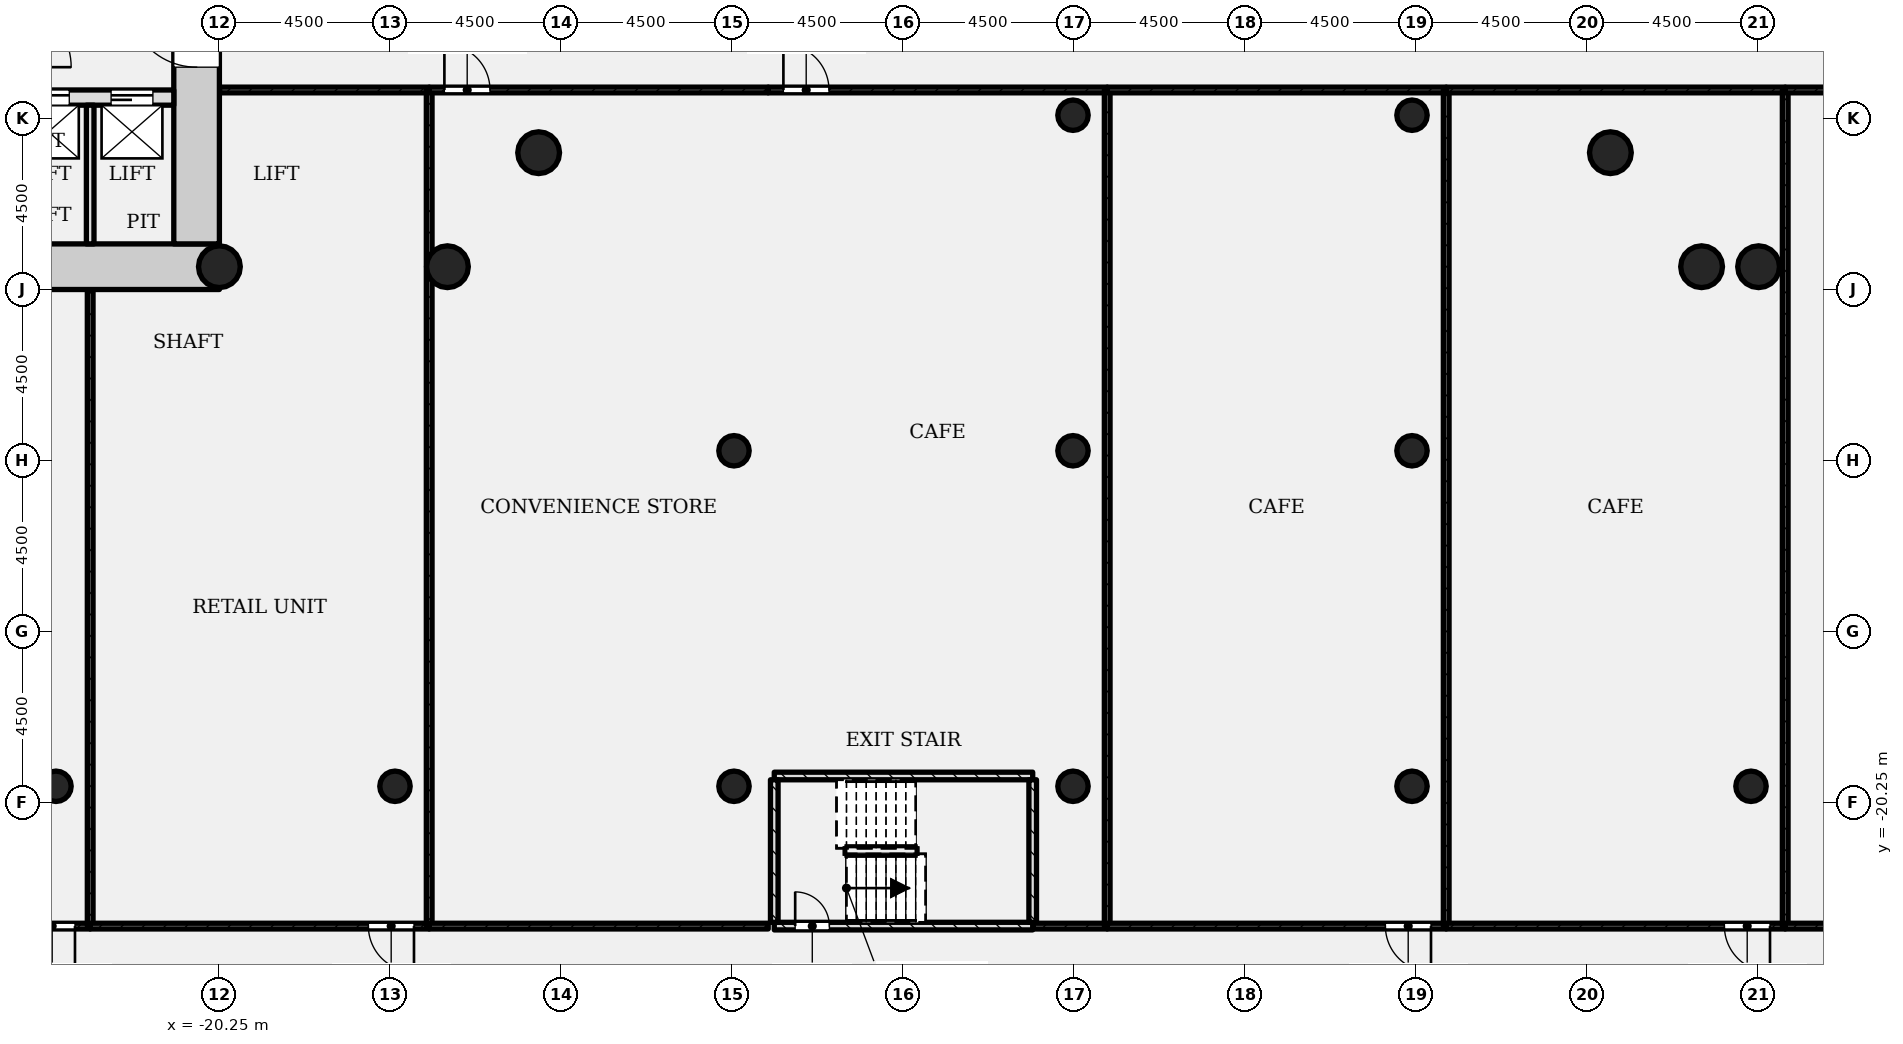
"""IFC4 building model, lengths in metres.
Left out: names, types, materials, properties, quantities, classifications, styles, units other than length and angle.
Written with IfcOpenShell. Run it as: python <this file> out.ifc"""

import sys

from ifc_helpers import new_model, si_unit, direction, frame, frame_2d, origin, origin_2d, place, context, subcontext, project, spatial, rectangle, hollow_circle, extrude, element, fill, save


model = new_model("IFC4")
c1 = context("Model", 3, precision=1e-05, world=origin(), true_north=direction((0.0, 1.0)))
c2 = subcontext(c1, "Body", "Model", "MODEL_VIEW")
j1 = project(units=[si_unit("LENGTHUNIT", "METRE"), si_unit("PLANEANGLEUNIT", "RADIAN")], contexts=[c1])
p1 = place(None, origin())
s1 = spatial("IfcSite", under=j1, at=p1, CompositionType="ELEMENT")
p2 = place(p1, origin())
s2 = spatial("IfcBuilding", under=s1, at=p2, CompositionType="ELEMENT")
p3 = place(p2, origin())
s3 = spatial("IfcBuildingStorey", under=s2, at=p3, CompositionType="ELEMENT", Elevation=0.0)
p4 = place(p3, frame((-28.05, -6.15, -0.4), z_axis=(0.0, 0.0, 1.0), x_axis=(1.0, 0.0, 0.0)))
e1 = element("IfcWall", 1, at=p4, inside=s3, PredefinedType="SHEAR", context=c2, shape_type="SweptSolid", body=[
    extrude(rectangle(XDim=7.8, YDim=1.2, at=frame_2d((3.9, 0.0))), origin(), (0.0, 0.0, 1.0), 6.4),
])
p5 = place(p3, frame((-20.85, -5.55, -0.4), z_axis=(0.0, 0.0, 1.0), x_axis=(0.0, 1.0, 0.0)))
e2 = element("IfcWall", 2, at=p5, inside=s3, PredefinedType="SHEAR", context=c2, shape_type="SweptSolid", body=[
    extrude(rectangle(XDim=12.3, YDim=1.2, at=frame_2d((6.15, 0.0))), origin(), (0.0, 0.0, 1.0), 6.4),
])
p6 = place(p5, frame((4.65, 0.0, 0.4)))
e3 = element("IfcOpeningElement", 3, at=p6, cuts=e2, PredefinedType="OPENING", context=c2, shape_type="SweptSolid", body=[
    extrude(rectangle(XDim=1.8, YDim=2.1, at=frame_2d((0.9, 1.05))), frame((0.0, 0.61, 0.0), z_axis=(0.0, -1.0, 0.0), x_axis=(1.0, 0.0, 0.0)), (0.0, 0.0, 1.0), 1.22),
])
p7 = place(p3, frame((-28.05, -1.7, -0.4), z_axis=(0.0, 0.0, 1.0), x_axis=(1.0, 0.0, 0.0)))
e4 = element("IfcWall", 4, at=p7, inside=s3, PredefinedType="SHEAR", context=c2, shape_type="SweptSolid", body=[
    extrude(rectangle(XDim=6.6, YDim=0.4, at=frame_2d((3.3, 0.0))), origin(), (0.0, 0.0, 1.0), 6.4),
])
p8 = place(p7, frame((0.55, 0.0, 0.4)))
e5 = element("IfcOpeningElement", 5, at=p8, cuts=e4, PredefinedType="OPENING", context=c2, shape_type="SweptSolid", body=[
    extrude(rectangle(XDim=1.1, YDim=2.1, at=frame_2d((0.55, 1.05))), frame((0.0, 0.21, 0.0), z_axis=(0.0, -1.0, 0.0), x_axis=(1.0, 0.0, 0.0)), (0.0, 0.0, 1.0), 0.42),
])
p9 = place(p7, frame((2.75, 0.0, 0.4)))
e6 = element("IfcOpeningElement", 6, at=p9, cuts=e4, PredefinedType="OPENING", context=c2, shape_type="SweptSolid", body=[
    extrude(rectangle(XDim=1.1, YDim=2.1, at=frame_2d((0.55, 1.05))), frame((0.0, 0.21, 0.0), z_axis=(0.0, -1.0, 0.0), x_axis=(1.0, 0.0, 0.0)), (0.0, 0.0, 1.0), 0.42),
])
p10 = place(p7, frame((4.95, 0.0, 0.4)))
e7 = element("IfcOpeningElement", 7, at=p10, cuts=e4, PredefinedType="OPENING", context=c2, shape_type="SweptSolid", body=[
    extrude(rectangle(XDim=1.1, YDim=2.1, at=frame_2d((0.55, 1.05))), frame((0.0, 0.21, 0.0), z_axis=(0.0, -1.0, 0.0), x_axis=(1.0, 0.0, 0.0)), (0.0, 0.0, 1.0), 0.42),
])
for number, where, z_axis, x_axis in (
    (8, (-20.25, -6.15, -0.4), (0.0, 0.0, 1.0), (1.0, 0.0, 0.0)),
    (9, (-14.25, -6.15, -0.4), (0.0, 0.0, 1.0), (1.0, 0.0, 0.0)),
    (10, (-11.85, -3.15, -0.4), (0.0, 0.0, 1.0), (1.0, 0.0, 0.0)),
    (11, (20.25, -6.15, -0.4), (0.0, 0.0, 1.0), (1.0, 0.0, 0.0)),
    (12, (18.75, -6.15, -0.4), (0.0, 0.0, 1.0), (1.0, 0.0, 0.0)),
    (13, (16.35, -3.15, -0.4), (0.0, 0.0, 1.0), (1.0, 0.0, 0.0)),
):
    element("IfcColumn", number, at=place(p3, frame(where, z_axis=z_axis, x_axis=x_axis)), inside=s3, PredefinedType="COLUMN", context=c2, shape_type="SweptSolid", body=[
        extrude(hollow_circle(Radius=0.55, WallThickness=0.04, at=origin_2d()), origin(), (0.0, 0.0, 1.0), 6.4),
    ])
for number, where, z_axis, x_axis in (
    (14, (-24.55, -19.821, -0.4), (0.0, 0.0, 1.0), (1.0, 0.0, 0.0)),
    (15, (-15.63, -19.821, -0.4), (0.0, 0.0, 1.0), (1.0, 0.0, 0.0)),
    (16, (-6.71, -19.821, -0.4), (0.0, 0.0, 1.0), (1.0, 0.0, 0.0)),
    (17, (2.21, -19.821, -0.4), (0.0, 0.0, 1.0), (1.0, 0.0, 0.0)),
    (18, (11.13, -19.821, -0.4), (0.0, 0.0, 1.0), (1.0, 0.0, 0.0)),
    (19, (20.05, -19.821, -0.4), (0.0, 0.0, 1.0), (1.0, 0.0, 0.0)),
    (20, (-6.71, -10.993, -0.4), (0.0, 0.0, 1.0), (1.0, 0.0, 0.0)),
    (21, (2.21, -10.993, -0.4), (0.0, 0.0, 1.0), (1.0, 0.0, 0.0)),
    (22, (11.13, -10.993, -0.4), (0.0, 0.0, 1.0), (1.0, 0.0, 0.0)),
    (23, (2.21, -2.164, -0.4), (0.0, 0.0, 1.0), (1.0, 0.0, 0.0)),
    (24, (11.13, -2.164, -0.4), (0.0, 0.0, 1.0), (1.0, 0.0, 0.0)),
):
    element("IfcColumn", number, at=place(p3, frame(where, z_axis=z_axis, x_axis=x_axis)), inside=s3, PredefinedType="COLUMN", context=c2, shape_type="SweptSolid", body=[
        extrude(hollow_circle(Radius=0.4, WallThickness=0.028, at=origin_2d()), origin(), (0.0, 0.0, 1.0), 6.4),
    ])
p11 = place(p3, frame((-23.65, -5.55, 0.0), z_axis=(0.0, 0.0, 1.0), x_axis=(0.0, 1.0, 0.0)))
e25 = element("IfcWall", 25, at=p11, inside=s3, PredefinedType="SOLIDWALL", context=c2, shape_type="SweptSolid", body=[
    extrude(rectangle(XDim=3.65, YDim=0.2, at=frame_2d((1.825, 0.0))), origin(), (0.0, 0.0, 1.0), 5.58),
])
p12 = place(p3, frame((-23.65, -23.5, 0.0), z_axis=(0.0, 0.0, 1.0), x_axis=(-1.0, 0.0, 0.0)))
e26 = element("IfcWall", 26, at=p12, inside=s3, PredefinedType="PARTITIONING", context=c2, shape_type="SweptSolid", body=[
    extrude(rectangle(XDim=8.92, YDim=0.15, at=frame_2d((4.46, 0.0))), origin(), (0.0, 0.0, 1.0), 5.58),
])
p13 = place(p12, frame((0.4, 0.0, 0.0)))
e27 = element("IfcOpeningElement", 27, at=p13, cuts=e26, PredefinedType="OPENING", context=c2, shape_type="SweptSolid", body=[
    extrude(rectangle(XDim=1.2, YDim=2.1, at=frame_2d((0.6, 1.05))), frame((0.0, 0.085, 0.0), z_axis=(0.0, -1.0, 0.0), x_axis=(1.0, 0.0, 0.0)), (0.0, 0.0, 1.0), 0.17),
])
p14 = place(p3, frame((-23.65, -6.75, 0.0), z_axis=(0.0, 0.0, 1.0), x_axis=(0.0, -1.0, 0.0)))
e28 = element("IfcWall", 28, at=p14, inside=s3, PredefinedType="PARTITIONING", context=c2, shape_type="SweptSolid", body=[
    extrude(rectangle(XDim=16.75, YDim=0.15, at=frame_2d((8.375, 0.0))), origin(), (0.0, 0.0, 1.0), 5.58),
])
p15 = place(p3, frame((-20.25, -1.5, 0.0), z_axis=(0.0, 0.0, 1.0), x_axis=(1.0, 0.0, 0.0)))
e29 = element("IfcWall", 29, at=p15, inside=s3, PredefinedType="PARTITIONING", context=c2, shape_type="SweptSolid", body=[
    extrude(rectangle(XDim=5.52, YDim=0.15, at=frame_2d((2.76, 0.0))), origin(), (0.0, 0.0, 1.0), 5.58),
])
p16 = place(p3, frame((-14.73, -23.5, 0.0), z_axis=(0.0, 0.0, 1.0), x_axis=(-1.0, 0.0, 0.0)))
e30 = element("IfcWall", 30, at=p16, inside=s3, PredefinedType="PARTITIONING", context=c2, shape_type="SweptSolid", body=[
    extrude(rectangle(XDim=8.92, YDim=0.15, at=frame_2d((4.46, 0.0))), origin(), (0.0, 0.0, 1.0), 5.58),
])
p17 = place(p16, frame((0.4, 0.0, 0.0)))
e31 = element("IfcOpeningElement", 31, at=p17, cuts=e30, PredefinedType="OPENING", context=c2, shape_type="SweptSolid", body=[
    extrude(rectangle(XDim=1.2, YDim=2.1, at=frame_2d((0.6, 1.05))), frame((0.0, 0.085, 0.0), z_axis=(0.0, -1.0, 0.0), x_axis=(1.0, 0.0, 0.0)), (0.0, 0.0, 1.0), 0.17),
])
p18 = place(p3, frame((-14.73, -1.5, 0.0), z_axis=(0.0, 0.0, 1.0), x_axis=(0.0, -1.0, 0.0)))
e32 = element("IfcWall", 32, at=p18, inside=s3, PredefinedType="PARTITIONING", context=c2, shape_type="SweptSolid", body=[
    extrude(rectangle(XDim=22.0, YDim=0.15, at=frame_2d((11.0, 0.0))), origin(), (0.0, 0.0, 1.0), 5.58),
])
p19 = place(p3, frame((-14.73, -1.5, 0.0), z_axis=(0.0, 0.0, 1.0), x_axis=(1.0, 0.0, 0.0)))
e33 = element("IfcWall", 33, at=p19, inside=s3, PredefinedType="PARTITIONING", context=c2, shape_type="SweptSolid", body=[
    extrude(rectangle(XDim=8.92, YDim=0.15, at=frame_2d((4.46, 0.0))), origin(), (0.0, 0.0, 1.0), 5.58),
])
p20 = place(p19, frame((0.4, 0.0, 0.0)))
e34 = element("IfcOpeningElement", 34, at=p20, cuts=e33, PredefinedType="OPENING", context=c2, shape_type="SweptSolid", body=[
    extrude(rectangle(XDim=1.2, YDim=2.1, at=frame_2d((0.6, 1.05))), frame((0.0, 0.085, 0.0), z_axis=(0.0, -1.0, 0.0), x_axis=(1.0, 0.0, 0.0)), (0.0, 0.0, 1.0), 0.17),
])
p21 = place(p3, frame((-5.81, -23.5, 0.0), z_axis=(0.0, 0.0, 1.0), x_axis=(-1.0, 0.0, 0.0)))
e35 = element("IfcWall", 35, at=p21, inside=s3, PredefinedType="PARTITIONING", context=c2, shape_type="SweptSolid", body=[
    extrude(rectangle(XDim=8.92, YDim=0.15, at=frame_2d((4.46, 0.0))), origin(), (0.0, 0.0, 1.0), 5.58),
])
p22 = place(p3, frame((-5.65, -23.5, 0.0), z_axis=(0.0, 0.0, 1.0), x_axis=(1.0, 0.0, 0.0)))
e36 = element("IfcWall", 36, at=p22, inside=s3, PredefinedType="SHEAR", context=c2, shape_type="SweptSolid", body=[
    extrude(rectangle(XDim=6.8, YDim=0.2, at=frame_2d((3.4, 0.0))), origin(), (0.0, 0.0, 1.0), 5.58),
])
p23 = place(p22, frame((0.55, 0.0, 0.0)))
e37 = element("IfcOpeningElement", 37, at=p23, cuts=e36, PredefinedType="OPENING", context=c2, shape_type="SweptSolid", body=[
    extrude(rectangle(XDim=0.9, YDim=2.1, at=frame_2d((0.45, 1.05))), frame((0.0, 0.11, 0.0), z_axis=(0.0, -1.0, 0.0), x_axis=(1.0, 0.0, 0.0)), (0.0, 0.0, 1.0), 0.22),
])
p24 = place(p3, frame((-5.65, -19.55, 0.0), z_axis=(0.0, 0.0, 1.0), x_axis=(1.0, 0.0, 0.0)))
e38 = element("IfcWall", 38, at=p24, inside=s3, PredefinedType="SHEAR", context=c2, shape_type="SweptSolid", body=[
    extrude(rectangle(XDim=6.8, YDim=0.2, at=frame_2d((3.4, 0.0))), origin(), (0.0, 0.0, 1.0), 5.58),
])
for number, where, z_axis, x_axis in (
    (39, (-5.65, -23.4, 0.0), (0.0, 0.0, 1.0), (0.0, 1.0, 0.0)),
    (40, (1.15, -23.4, 0.0), (0.0, 0.0, 1.0), (0.0, 1.0, 0.0)),
):
    element("IfcWall", number, at=place(p3, frame(where, z_axis=z_axis, x_axis=x_axis)), inside=s3, PredefinedType="SHEAR", context=c2, shape_type="SweptSolid", body=[
        extrude(rectangle(XDim=3.75, YDim=0.2, at=frame_2d((1.875, 0.0))), origin(), (0.0, 0.0, 1.0), 5.58),
    ])
p25 = place(p3, frame((-5.81, -1.5, 0.0), z_axis=(0.0, 0.0, 1.0), x_axis=(1.0, 0.0, 0.0)))
e41 = element("IfcWall", 41, at=p25, inside=s3, PredefinedType="PARTITIONING", context=c2, shape_type="SweptSolid", body=[
    extrude(rectangle(XDim=8.92, YDim=0.15, at=frame_2d((4.46, 0.0))), origin(), (0.0, 0.0, 1.0), 5.58),
])
p26 = place(p25, frame((0.4, 0.0, 0.0)))
e42 = element("IfcOpeningElement", 42, at=p26, cuts=e41, PredefinedType="OPENING", context=c2, shape_type="SweptSolid", body=[
    extrude(rectangle(XDim=1.2, YDim=2.1, at=frame_2d((0.6, 1.05))), frame((0.0, 0.085, 0.0), z_axis=(0.0, -1.0, 0.0), x_axis=(1.0, 0.0, 0.0)), (0.0, 0.0, 1.0), 0.17),
])
p27 = place(p3, frame((3.11, -23.5, 0.0), z_axis=(0.0, 0.0, 1.0), x_axis=(-1.0, 0.0, 0.0)))
e43 = element("IfcWall", 43, at=p27, inside=s3, PredefinedType="PARTITIONING", context=c2, shape_type="SweptSolid", body=[
    extrude(rectangle(XDim=1.96, YDim=0.15, at=frame_2d((0.98, 0.0))), origin(), (0.0, 0.0, 1.0), 5.58),
])
p28 = place(p3, frame((3.11, -1.5, 0.0), z_axis=(0.0, 0.0, 1.0), x_axis=(0.0, -1.0, 0.0)))
e44 = element("IfcWall", 44, at=p28, inside=s3, PredefinedType="PARTITIONING", context=c2, shape_type="SweptSolid", body=[
    extrude(rectangle(XDim=22.0, YDim=0.15, at=frame_2d((11.0, 0.0))), origin(), (0.0, 0.0, 1.0), 5.58),
])
p29 = place(p3, frame((12.03, -23.5, 0.0), z_axis=(0.0, 0.0, 1.0), x_axis=(-1.0, 0.0, 0.0)))
e45 = element("IfcWall", 45, at=p29, inside=s3, PredefinedType="PARTITIONING", context=c2, shape_type="SweptSolid", body=[
    extrude(rectangle(XDim=8.92, YDim=0.15, at=frame_2d((4.46, 0.0))), origin(), (0.0, 0.0, 1.0), 5.58),
])
p30 = place(p29, frame((0.4, 0.0, 0.0)))
e46 = element("IfcOpeningElement", 46, at=p30, cuts=e45, PredefinedType="OPENING", context=c2, shape_type="SweptSolid", body=[
    extrude(rectangle(XDim=1.2, YDim=2.1, at=frame_2d((0.6, 1.05))), frame((0.0, 0.085, 0.0), z_axis=(0.0, -1.0, 0.0), x_axis=(1.0, 0.0, 0.0)), (0.0, 0.0, 1.0), 0.17),
])
p31 = place(p3, frame((3.11, -1.5, 0.0), z_axis=(0.0, 0.0, 1.0), x_axis=(1.0, 0.0, 0.0)))
e47 = element("IfcWall", 47, at=p31, inside=s3, PredefinedType="PARTITIONING", context=c2, shape_type="SweptSolid", body=[
    extrude(rectangle(XDim=8.92, YDim=0.15, at=frame_2d((4.46, 0.0))), origin(), (0.0, 0.0, 1.0), 5.58),
])
p32 = place(p3, frame((12.03, -1.5, 0.0), z_axis=(0.0, 0.0, 1.0), x_axis=(0.0, -1.0, 0.0)))
e48 = element("IfcWall", 48, at=p32, inside=s3, PredefinedType="PARTITIONING", context=c2, shape_type="SweptSolid", body=[
    extrude(rectangle(XDim=22.0, YDim=0.15, at=frame_2d((11.0, 0.0))), origin(), (0.0, 0.0, 1.0), 5.58),
])
p33 = place(p3, frame((20.95, -23.5, 0.0), z_axis=(0.0, 0.0, 1.0), x_axis=(-1.0, 0.0, 0.0)))
e49 = element("IfcWall", 49, at=p33, inside=s3, PredefinedType="PARTITIONING", context=c2, shape_type="SweptSolid", body=[
    extrude(rectangle(XDim=8.92, YDim=0.15, at=frame_2d((4.46, 0.0))), origin(), (0.0, 0.0, 1.0), 5.58),
])
p34 = place(p33, frame((0.4, 0.0, 0.0)))
e50 = element("IfcOpeningElement", 50, at=p34, cuts=e49, PredefinedType="OPENING", context=c2, shape_type="SweptSolid", body=[
    extrude(rectangle(XDim=1.2, YDim=2.1, at=frame_2d((0.6, 1.05))), frame((0.0, 0.085, 0.0), z_axis=(0.0, -1.0, 0.0), x_axis=(1.0, 0.0, 0.0)), (0.0, 0.0, 1.0), 0.17),
])
p35 = place(p3, frame((12.03, -1.5, 0.0), z_axis=(0.0, 0.0, 1.0), x_axis=(1.0, 0.0, 0.0)))
e51 = element("IfcWall", 51, at=p35, inside=s3, PredefinedType="PARTITIONING", context=c2, shape_type="SweptSolid", body=[
    extrude(rectangle(XDim=8.92, YDim=0.15, at=frame_2d((4.46, 0.0))), origin(), (0.0, 0.0, 1.0), 5.58),
])
p36 = place(p3, frame((20.95, -1.5, 0.0), z_axis=(0.0, 0.0, 1.0), x_axis=(0.0, -1.0, 0.0)))
e52 = element("IfcWall", 52, at=p36, inside=s3, PredefinedType="PARTITIONING", context=c2, shape_type="SweptSolid", body=[
    extrude(rectangle(XDim=22.0, YDim=0.15, at=frame_2d((11.0, 0.0))), origin(), (0.0, 0.0, 1.0), 5.58),
])
p37 = place(p3, frame((29.87, -23.5, 0.0), z_axis=(0.0, 0.0, 1.0), x_axis=(-1.0, 0.0, 0.0)))
e53 = element("IfcWall", 53, at=p37, inside=s3, PredefinedType="PARTITIONING", context=c2, shape_type="SweptSolid", body=[
    extrude(rectangle(XDim=8.92, YDim=0.15, at=frame_2d((4.46, 0.0))), origin(), (0.0, 0.0, 1.0), 5.58),
])
p38 = place(p37, frame((1.0, 0.0, 0.0)))
e54 = element("IfcOpeningElement", 54, at=p38, cuts=e53, PredefinedType="OPENING", context=c2, shape_type="SweptSolid", body=[
    extrude(rectangle(XDim=1.2, YDim=2.1, at=frame_2d((0.6, 1.05))), frame((0.0, 0.085, 0.0), z_axis=(0.0, -1.0, 0.0), x_axis=(1.0, 0.0, 0.0)), (0.0, 0.0, 1.0), 0.17),
])
p39 = place(p3, frame((20.95, -1.5, 0.0), z_axis=(0.0, 0.0, 1.0), x_axis=(1.0, 0.0, 0.0)))
e55 = element("IfcWall", 55, at=p39, inside=s3, PredefinedType="PARTITIONING", context=c2, shape_type="SweptSolid", body=[
    extrude(rectangle(XDim=8.3, YDim=0.15, at=frame_2d((4.15, 0.0))), origin(), (0.0, 0.0, 1.0), 5.58),
])
p40 = place(p13, origin())
e56 = element("IfcDoor", 56, at=p40, inside=s3, OperationType="SINGLE_SWING_RIGHT", PredefinedType="DOOR", context=c2, shape_type="SweptSolid", body=[
    extrude(rectangle(XDim=1.2, YDim=2.1, at=frame_2d((0.6, 1.05))), frame((0.0, 0.025, 0.0), z_axis=(0.0, -1.0, 0.0), x_axis=(1.0, 0.0, 0.0)), (0.0, 0.0, 1.0), 0.05),
])
fill(e27, e56)
p41 = place(p17, origin())
e57 = element("IfcDoor", 57, at=p41, inside=s3, OperationType="SINGLE_SWING_RIGHT", PredefinedType="DOOR", context=c2, shape_type="SweptSolid", body=[
    extrude(rectangle(XDim=1.2, YDim=2.1, at=frame_2d((0.6, 1.05))), frame((0.0, 0.025, 0.0), z_axis=(0.0, -1.0, 0.0), x_axis=(1.0, 0.0, 0.0)), (0.0, 0.0, 1.0), 0.05),
])
fill(e31, e57)
p42 = place(p20, origin())
e58 = element("IfcDoor", 58, at=p42, inside=s3, OperationType="SINGLE_SWING_RIGHT", PredefinedType="DOOR", context=c2, shape_type="SweptSolid", body=[
    extrude(rectangle(XDim=1.2, YDim=2.1, at=frame_2d((0.6, 1.05))), frame((0.0, 0.025, 0.0), z_axis=(0.0, -1.0, 0.0), x_axis=(1.0, 0.0, 0.0)), (0.0, 0.0, 1.0), 0.05),
])
fill(e34, e58)
p43 = place(p23, origin())
e59 = element("IfcDoor", 59, at=p43, inside=s3, OperationType="SINGLE_SWING_RIGHT", PredefinedType="DOOR", context=c2, shape_type="SweptSolid", body=[
    extrude(rectangle(XDim=0.9, YDim=2.1, at=frame_2d((0.45, 1.05))), frame((0.0, 0.025, 0.0), z_axis=(0.0, -1.0, 0.0), x_axis=(1.0, 0.0, 0.0)), (0.0, 0.0, 1.0), 0.05),
])
fill(e37, e59)
p44 = place(p9, origin())
e60 = element("IfcDoor", 60, at=p44, inside=s3, OperationType="SLIDING_TO_LEFT", PredefinedType="DOOR", context=c2, shape_type="SweptSolid", body=[
    extrude(rectangle(XDim=1.1, YDim=2.1, at=frame_2d((0.55, 1.05))), frame((0.0, 0.025, 0.0), z_axis=(0.0, -1.0, 0.0), x_axis=(1.0, 0.0, 0.0)), (0.0, 0.0, 1.0), 0.05),
])
fill(e6, e60)
p45 = place(p10, origin())
e61 = element("IfcDoor", 61, at=p45, inside=s3, OperationType="SLIDING_TO_LEFT", PredefinedType="DOOR", context=c2, shape_type="SweptSolid", body=[
    extrude(rectangle(XDim=1.1, YDim=2.1, at=frame_2d((0.55, 1.05))), frame((0.0, 0.025, 0.0), z_axis=(0.0, -1.0, 0.0), x_axis=(1.0, 0.0, 0.0)), (0.0, 0.0, 1.0), 0.05),
])
fill(e7, e61)
p46 = place(p6, origin())
e62 = element("IfcDoor", 62, at=p46, inside=s3, OperationType="SINGLE_SWING_LEFT", PredefinedType="DOOR", context=c2, shape_type="SweptSolid", body=[
    extrude(rectangle(XDim=1.8, YDim=2.1, at=frame_2d((0.9, 1.05))), frame((0.0, 0.025, 0.0), z_axis=(0.0, -1.0, 0.0), x_axis=(1.0, 0.0, 0.0)), (0.0, 0.0, 1.0), 0.05),
])
fill(e3, e62)
p47 = place(p26, origin())
e63 = element("IfcDoor", 63, at=p47, inside=s3, OperationType="SINGLE_SWING_RIGHT", PredefinedType="DOOR", context=c2, shape_type="SweptSolid", body=[
    extrude(rectangle(XDim=1.2, YDim=2.1, at=frame_2d((0.6, 1.05))), frame((0.0, 0.025, 0.0), z_axis=(0.0, -1.0, 0.0), x_axis=(1.0, 0.0, 0.0)), (0.0, 0.0, 1.0), 0.05),
])
fill(e42, e63)
p48 = place(p30, origin())
e64 = element("IfcDoor", 64, at=p48, inside=s3, OperationType="SINGLE_SWING_RIGHT", PredefinedType="DOOR", context=c2, shape_type="SweptSolid", body=[
    extrude(rectangle(XDim=1.2, YDim=2.1, at=frame_2d((0.6, 1.05))), frame((0.0, 0.025, 0.0), z_axis=(0.0, -1.0, 0.0), x_axis=(1.0, 0.0, 0.0)), (0.0, 0.0, 1.0), 0.05),
])
fill(e46, e64)
p49 = place(p34, origin())
e65 = element("IfcDoor", 65, at=p49, inside=s3, OperationType="SINGLE_SWING_RIGHT", PredefinedType="DOOR", context=c2, shape_type="SweptSolid", body=[
    extrude(rectangle(XDim=1.2, YDim=2.1, at=frame_2d((0.6, 1.05))), frame((0.0, 0.025, 0.0), z_axis=(0.0, -1.0, 0.0), x_axis=(1.0, 0.0, 0.0)), (0.0, 0.0, 1.0), 0.05),
])
fill(e50, e65)
save(model, sys.argv[1])
